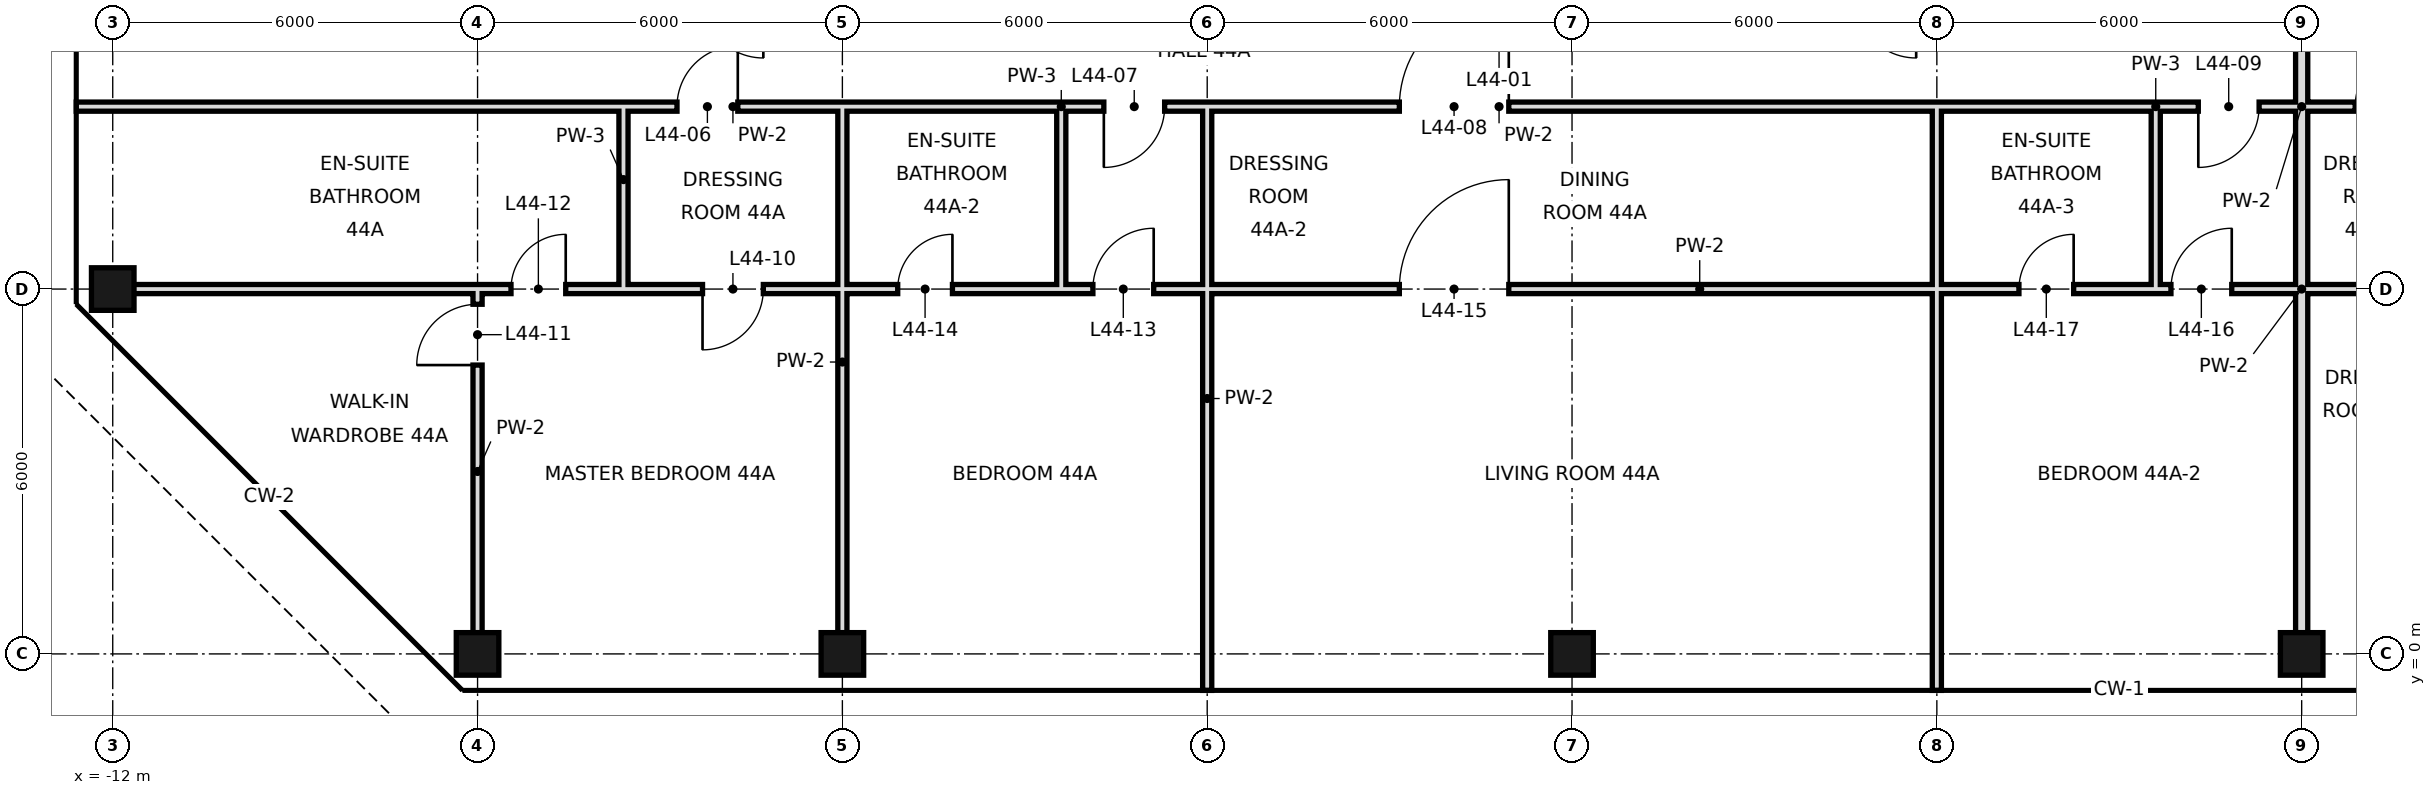
"""IFC4 building model, lengths in metres.
Left out: names, types, materials, properties, quantities, classifications, styles, units other than length and angle.
Written with IfcOpenShell. Run it as: python <this file> out.ifc"""

import sys

from ifc_helpers import new_model, si_unit, direction, frame, frame_2d, origin, origin_2d, place, context, subcontext, project, spatial, rectangle, hollow_rectangle, extrude, element, fill, save


model = new_model("IFC4")
c1 = context("Model", 3, precision=1e-05, world=origin(), true_north=direction((0.0, 1.0)))
c2 = subcontext(c1, "Body", "Model", "MODEL_VIEW")
j1 = project(units=[si_unit("LENGTHUNIT", "METRE"), si_unit("PLANEANGLEUNIT", "RADIAN")], contexts=[c1])
p1 = place(None, origin())
s1 = spatial("IfcSite", under=j1, at=p1, CompositionType="ELEMENT")
p2 = place(p1, origin())
s2 = spatial("IfcBuilding", under=s1, at=p2, CompositionType="ELEMENT")
p3 = place(p2, frame((0.0, 0.0, 192.0)))
s3 = spatial("IfcBuildingStorey", under=s2, at=p3, CompositionType="ELEMENT", Elevation=192.0)
for number, where, z_axis, x_axis in (
    (1, (-12.0, 6.0, -0.3), (0.0, 0.0, 1.0), (1.0, 0.0, 0.0)),
    (2, (-6.0, 0.0, -0.3), (0.0, 0.0, 1.0), (1.0, 0.0, 0.0)),
):
    element("IfcColumn", number, at=place(p3, frame(where, z_axis=z_axis, x_axis=x_axis)), inside=s3, PredefinedType="COLUMN", context=c2, shape_type="SweptSolid", body=[
        extrude(hollow_rectangle(XDim=0.7, YDim=0.7, WallThickness=0.036, at=origin_2d()), origin(), (0.0, 0.0, 1.0), 3.9),
    ])
for number, where, z_axis, x_axis in (
    (3, (0.0, 0.0, 0.0), (0.0, 0.0, 1.0), (1.0, 0.0, 0.0)),
    (4, (12.0, 0.0, 0.0), (0.0, 0.0, 1.0), (1.0, 0.0, 0.0)),
    (5, (24.0, 0.0, 0.0), (0.0, 0.0, 1.0), (1.0, 0.0, 0.0)),
):
    element("IfcColumn", number, at=place(p3, frame(where, z_axis=z_axis, x_axis=x_axis)), inside=s3, PredefinedType="COLUMN", context=c2, shape_type="SweptSolid", body=[
        extrude(hollow_rectangle(XDim=0.7, YDim=0.7, WallThickness=0.036, at=origin_2d()), origin(), (0.0, 0.0, 1.0), 3.6),
    ])
p4 = place(p3, frame((-3.6, 6.0, 0.0), z_axis=(0.0, 0.0, 1.0), x_axis=(0.0, 1.0, 0.0)))
e6 = element("IfcWall", 6, at=p4, inside=s3, PredefinedType="PARTITIONING", context=c2, shape_type="SweptSolid", body=[
    extrude(rectangle(XDim=3.0, YDim=0.15, at=frame_2d((1.5, 0.0))), origin(), (0.0, 0.0, 1.0), 3.42),
])
p5 = place(p3, frame((-6.0, 0.0, 0.0), z_axis=(0.0, 0.0, 1.0), x_axis=(0.0, 1.0, 0.0)))
e7 = element("IfcWall", 7, at=p5, inside=s3, PredefinedType="PARTITIONING", context=c2, shape_type="SweptSolid", body=[
    extrude(rectangle(XDim=6.0, YDim=0.15, at=frame_2d((3.0, 0.0))), origin(), (0.0, 0.0, 1.0), 3.42),
])
p6 = place(p5, frame((4.75, 0.0, 0.0)))
e8 = element("IfcOpeningElement", 8, at=p6, cuts=e7, PredefinedType="OPENING", context=c2, shape_type="SweptSolid", body=[
    extrude(rectangle(XDim=1.0, YDim=2.4, at=frame_2d((0.5, 1.2))), frame((0.0, 0.085, 0.0), z_axis=(0.0, -1.0, 0.0), x_axis=(1.0, 0.0, 0.0)), (0.0, 0.0, 1.0), 0.17),
])
p7 = place(p3, frame((0.0, 0.0, 0.0), z_axis=(0.0, 0.0, 1.0), x_axis=(0.0, 1.0, 0.0)))
e9 = element("IfcWall", 9, at=p7, inside=s3, PredefinedType="PARTITIONING", context=c2, shape_type="SweptSolid", body=[
    extrude(rectangle(XDim=6.0, YDim=0.15, at=frame_2d((3.0, 0.0))), origin(), (0.0, 0.0, 1.0), 2.72),
])
p8 = place(p3, frame((0.0, 6.0, 0.0), z_axis=(0.0, 0.0, 1.0), x_axis=(0.0, 1.0, 0.0)))
e10 = element("IfcWall", 10, at=p8, inside=s3, PredefinedType="PARTITIONING", context=c2, shape_type="SweptSolid", body=[
    extrude(rectangle(XDim=3.0, YDim=0.15, at=frame_2d((1.5, 0.0))), origin(), (0.0, 0.0, 1.0), 2.72),
])
p9 = place(p3, frame((18.0, -0.6, 0.0), z_axis=(0.0, 0.0, 1.0), x_axis=(0.0, 1.0, 0.0)))
e11 = element("IfcWall", 11, at=p9, inside=s3, PredefinedType="PARTITIONING", context=c2, shape_type="SweptSolid", body=[
    extrude(rectangle(XDim=6.6, YDim=0.15, at=frame_2d((3.3, 0.0))), origin(), (0.0, 0.0, 1.0), 2.72),
])
p10 = place(p3, frame((18.0, 6.0, 0.0), z_axis=(0.0, 0.0, 1.0), x_axis=(0.0, 1.0, 0.0)))
e12 = element("IfcWall", 12, at=p10, inside=s3, PredefinedType="PARTITIONING", context=c2, shape_type="SweptSolid", body=[
    extrude(rectangle(XDim=3.0, YDim=0.15, at=frame_2d((1.5, 0.0))), origin(), (0.0, 0.0, 1.0), 2.72),
])
p11 = place(p3, frame((21.6, 6.0, 0.0), z_axis=(0.0, 0.0, 1.0), x_axis=(0.0, 1.0, 0.0)))
e13 = element("IfcWall", 13, at=p11, inside=s3, PredefinedType="PARTITIONING", context=c2, shape_type="SweptSolid", body=[
    extrude(rectangle(XDim=3.0, YDim=0.15, at=frame_2d((1.5, 0.0))), origin(), (0.0, 0.0, 1.0), 3.42),
])
p12 = place(p3, frame((24.0, 0.0, 0.0), z_axis=(0.0, 0.0, 1.0), x_axis=(0.0, 1.0, 0.0)))
e14 = element("IfcWall", 14, at=p12, inside=s3, PredefinedType="SOLIDWALL", context=c2, shape_type="SweptSolid", body=[
    extrude(rectangle(XDim=15.3, YDim=0.2, at=frame_2d((7.65, 0.0))), origin(), (0.0, 0.0, 1.0), 2.72),
])
p13 = place(p3, frame((3.6, 6.0, 0.0), z_axis=(0.0, 0.0, 1.0), x_axis=(0.0, 1.0, 0.0)))
e15 = element("IfcWall", 15, at=p13, inside=s3, PredefinedType="PARTITIONING", context=c2, shape_type="SweptSolid", body=[
    extrude(rectangle(XDim=3.0, YDim=0.15, at=frame_2d((1.5, 0.0))), origin(), (0.0, 0.0, 1.0), 3.42),
])
p14 = place(p3, frame((6.0, -0.6, 0.0), z_axis=(0.0, 0.0, 1.0), x_axis=(0.0, 1.0, 0.0)))
e16 = element("IfcWall", 16, at=p14, inside=s3, PredefinedType="PARTITIONING", context=c2, shape_type="SweptSolid", body=[
    extrude(rectangle(XDim=9.6, YDim=0.15, at=frame_2d((4.8, 0.0))), origin(), (0.0, 0.0, 1.0), 2.72),
])
p15 = place(p3, frame((-3.6, 6.0, 0.0), z_axis=(0.0, 0.0, 1.0), x_axis=(1.0, 0.0, 0.0)))
e17 = element("IfcWall", 17, at=p15, inside=s3, PredefinedType="PARTITIONING", context=c2, shape_type="SweptSolid", body=[
    extrude(rectangle(XDim=3.6, YDim=0.15, at=frame_2d((1.8, 0.0))), origin(), (0.0, 0.0, 1.0), 2.72),
])
p16 = place(p15, frame((1.3, 0.0, 0.0)))
e18 = element("IfcOpeningElement", 18, at=p16, cuts=e17, PredefinedType="OPENING", context=c2, shape_type="SweptSolid", body=[
    extrude(rectangle(XDim=1.0, YDim=2.4, at=frame_2d((0.5, 1.2))), frame((0.0, 0.085, 0.0), z_axis=(0.0, -1.0, 0.0), x_axis=(1.0, 0.0, 0.0)), (0.0, 0.0, 1.0), 0.17),
])
p17 = place(p3, frame((3.6, 6.0, 0.0), z_axis=(0.0, 0.0, 1.0), x_axis=(1.0, 0.0, 0.0)))
e19 = element("IfcWall", 19, at=p17, inside=s3, PredefinedType="PARTITIONING", context=c2, shape_type="SweptSolid", body=[
    extrude(rectangle(XDim=14.4, YDim=0.15, at=frame_2d((7.2, 0.0))), origin(), (0.0, 0.0, 1.0), 2.97),
])
p18 = place(p17, frame((0.52, 0.0, 0.0)))
e20 = element("IfcOpeningElement", 20, at=p18, cuts=e19, PredefinedType="OPENING", context=c2, shape_type="SweptSolid", body=[
    extrude(rectangle(XDim=1.0, YDim=2.4, at=frame_2d((0.5, 1.2))), frame((0.0, 0.085, 0.0), z_axis=(0.0, -1.0, 0.0), x_axis=(1.0, 0.0, 0.0)), (0.0, 0.0, 1.0), 0.17),
])
p19 = place(p17, frame((5.56, 0.0, 0.0)))
e21 = element("IfcOpeningElement", 21, at=p19, cuts=e19, PredefinedType="OPENING", context=c2, shape_type="SweptSolid", body=[
    extrude(rectangle(XDim=1.8, YDim=2.4, at=frame_2d((0.9, 1.2))), frame((0.0, 0.085, 0.0), z_axis=(0.0, -1.0, 0.0), x_axis=(1.0, 0.0, 0.0)), (0.0, 0.0, 1.0), 0.17),
])
p20 = place(p3, frame((21.6, 6.0, 0.0), z_axis=(0.0, 0.0, 1.0), x_axis=(1.0, 0.0, 0.0)))
e22 = element("IfcWall", 22, at=p20, inside=s3, PredefinedType="PARTITIONING", context=c2, shape_type="SweptSolid", body=[
    extrude(rectangle(XDim=4.8, YDim=0.15, at=frame_2d((2.4, 0.0))), origin(), (0.0, 0.0, 1.0), 2.97),
])
p21 = place(p20, frame((0.25, 0.0, 0.0)))
e23 = element("IfcOpeningElement", 23, at=p21, cuts=e22, PredefinedType="OPENING", context=c2, shape_type="SweptSolid", body=[
    extrude(rectangle(XDim=1.0, YDim=2.4, at=frame_2d((0.5, 1.2))), frame((0.0, 0.085, 0.0), z_axis=(0.0, -1.0, 0.0), x_axis=(1.0, 0.0, 0.0)), (0.0, 0.0, 1.0), 0.17),
])
p22 = place(p20, frame((3.55, 0.0, 0.0)))
e24 = element("IfcOpeningElement", 24, at=p22, cuts=e22, PredefinedType="OPENING", context=c2, shape_type="SweptSolid", body=[
    extrude(rectangle(XDim=1.0, YDim=2.4, at=frame_2d((0.5, 1.2))), frame((0.0, 0.085, 0.0), z_axis=(0.0, -1.0, 0.0), x_axis=(1.0, 0.0, 0.0)), (0.0, 0.0, 1.0), 0.17),
])
p23 = place(p3, frame((-12.0, 6.0, 0.0), z_axis=(0.0, 0.0, 1.0), x_axis=(1.0, 0.0, 0.0)))
e25 = element("IfcWall", 25, at=p23, inside=s3, PredefinedType="PARTITIONING", context=c2, shape_type="SweptSolid", body=[
    extrude(rectangle(XDim=8.4, YDim=0.15, at=frame_2d((4.2, 0.0))), origin(), (0.0, 0.0, 1.0), 2.72),
])
p24 = place(p23, frame((6.55, 0.0, 0.0)))
e26 = element("IfcOpeningElement", 26, at=p24, cuts=e25, PredefinedType="OPENING", context=c2, shape_type="SweptSolid", body=[
    extrude(rectangle(XDim=0.9, YDim=2.4, at=frame_2d((0.45, 1.2))), frame((0.0, 0.085, 0.0), z_axis=(0.0, -1.0, 0.0), x_axis=(1.0, 0.0, 0.0)), (0.0, 0.0, 1.0), 0.17),
])
p25 = place(p3, frame((0.0, 6.0, 0.0), z_axis=(0.0, 0.0, 1.0), x_axis=(1.0, 0.0, 0.0)))
e27 = element("IfcWall", 27, at=p25, inside=s3, PredefinedType="PARTITIONING", context=c2, shape_type="SweptSolid", body=[
    extrude(rectangle(XDim=3.6, YDim=0.15, at=frame_2d((1.8, 0.0))), origin(), (0.0, 0.0, 1.0), 2.97),
])
p26 = place(p25, frame((0.91, 0.0, 0.0)))
e28 = element("IfcOpeningElement", 28, at=p26, cuts=e27, PredefinedType="OPENING", context=c2, shape_type="SweptSolid", body=[
    extrude(rectangle(XDim=0.9, YDim=2.4, at=frame_2d((0.45, 1.2))), frame((0.0, 0.085, 0.0), z_axis=(0.0, -1.0, 0.0), x_axis=(1.0, 0.0, 0.0)), (0.0, 0.0, 1.0), 0.17),
])
p27 = place(p3, frame((18.0, 6.0, 0.0), z_axis=(0.0, 0.0, 1.0), x_axis=(1.0, 0.0, 0.0)))
e29 = element("IfcWall", 29, at=p27, inside=s3, PredefinedType="PARTITIONING", context=c2, shape_type="SweptSolid", body=[
    extrude(rectangle(XDim=3.6, YDim=0.15, at=frame_2d((1.8, 0.0))), origin(), (0.0, 0.0, 1.0), 2.97),
])
p28 = place(p27, frame((1.35, 0.0, 0.0)))
e30 = element("IfcOpeningElement", 30, at=p28, cuts=e29, PredefinedType="OPENING", context=c2, shape_type="SweptSolid", body=[
    extrude(rectangle(XDim=0.9, YDim=2.4, at=frame_2d((0.45, 1.2))), frame((0.0, 0.085, 0.0), z_axis=(0.0, -1.0, 0.0), x_axis=(1.0, 0.0, 0.0)), (0.0, 0.0, 1.0), 0.17),
])
p29 = place(p3, frame((-3.6, 9.0, 0.0), z_axis=(0.0, 0.0, 1.0), x_axis=(1.0, 0.0, 0.0)))
e31 = element("IfcWall", 31, at=p29, inside=s3, PredefinedType="PARTITIONING", context=c2, shape_type="SweptSolid", body=[
    extrude(rectangle(XDim=3.6, YDim=0.15, at=frame_2d((1.8, 0.0))), origin(), (0.0, 0.0, 1.0), 3.42),
])
p30 = place(p29, frame((0.88, 0.0, 0.0)))
e32 = element("IfcOpeningElement", 32, at=p30, cuts=e31, PredefinedType="OPENING", context=c2, shape_type="SweptSolid", body=[
    extrude(rectangle(XDim=1.0, YDim=2.4, at=frame_2d((0.5, 1.2))), frame((0.0, 0.085, 0.0), z_axis=(0.0, -1.0, 0.0), x_axis=(1.0, 0.0, 0.0)), (0.0, 0.0, 1.0), 0.17),
])
p31 = place(p3, frame((3.6, 9.0, 0.0), z_axis=(0.0, 0.0, 1.0), x_axis=(1.0, 0.0, 0.0)))
e33 = element("IfcWall", 33, at=p31, inside=s3, PredefinedType="PARTITIONING", context=c2, shape_type="SweptSolid", body=[
    extrude(rectangle(XDim=14.4, YDim=0.15, at=frame_2d((7.2, 0.0))), origin(), (0.0, 0.0, 1.0), 3.42),
])
p32 = place(p31, frame((0.7, 0.0, 0.0)))
e34 = element("IfcOpeningElement", 34, at=p32, cuts=e33, PredefinedType="OPENING", context=c2, shape_type="SweptSolid", body=[
    extrude(rectangle(XDim=1.0, YDim=2.4, at=frame_2d((0.5, 1.2))), frame((0.0, 0.085, 0.0), z_axis=(0.0, -1.0, 0.0), x_axis=(1.0, 0.0, 0.0)), (0.0, 0.0, 1.0), 0.17),
])
p33 = place(p31, frame((5.56, 0.0, 0.0)))
e35 = element("IfcOpeningElement", 35, at=p33, cuts=e33, PredefinedType="OPENING", context=c2, shape_type="SweptSolid", body=[
    extrude(rectangle(XDim=1.8, YDim=2.4, at=frame_2d((0.9, 1.2))), frame((0.0, 0.085, 0.0), z_axis=(0.0, -1.0, 0.0), x_axis=(1.0, 0.0, 0.0)), (0.0, 0.0, 1.0), 0.17),
])
p34 = place(p3, frame((21.6, 9.0, 0.0), z_axis=(0.0, 0.0, 1.0), x_axis=(1.0, 0.0, 0.0)))
e36 = element("IfcWall", 36, at=p34, inside=s3, PredefinedType="PARTITIONING", context=c2, shape_type="SweptSolid", body=[
    extrude(rectangle(XDim=4.8, YDim=0.15, at=frame_2d((2.4, 0.0))), origin(), (0.0, 0.0, 1.0), 3.42),
])
p35 = place(p34, frame((0.7, 0.0, 0.0)))
e37 = element("IfcOpeningElement", 37, at=p35, cuts=e36, PredefinedType="OPENING", context=c2, shape_type="SweptSolid", body=[
    extrude(rectangle(XDim=1.0, YDim=2.4, at=frame_2d((0.5, 1.2))), frame((0.0, 0.085, 0.0), z_axis=(0.0, -1.0, 0.0), x_axis=(1.0, 0.0, 0.0)), (0.0, 0.0, 1.0), 0.17),
])
p36 = place(p34, frame((3.28, 0.0, 0.0)))
e38 = element("IfcOpeningElement", 38, at=p36, cuts=e36, PredefinedType="OPENING", context=c2, shape_type="SweptSolid", body=[
    extrude(rectangle(XDim=1.0, YDim=2.4, at=frame_2d((0.5, 1.2))), frame((0.0, 0.085, 0.0), z_axis=(0.0, -1.0, 0.0), x_axis=(1.0, 0.0, 0.0)), (0.0, 0.0, 1.0), 0.17),
])
p37 = place(p3, frame((-12.6, 9.0, 0.0), z_axis=(0.0, 0.0, 1.0), x_axis=(1.0, 0.0, 0.0)))
e39 = element("IfcWall", 39, at=p37, inside=s3, PredefinedType="PARTITIONING", context=c2, shape_type="SweptSolid", body=[
    extrude(rectangle(XDim=9.0, YDim=0.15, at=frame_2d((4.5, 0.0))), origin(), (0.0, 0.0, 1.0), 3.42),
])
for number, where, z_axis, x_axis in (
    (40, (0.0, 9.0, 0.0), (0.0, 0.0, 1.0), (1.0, 0.0, 0.0)),
    (41, (18.0, 9.0, 0.0), (0.0, 0.0, 1.0), (1.0, 0.0, 0.0)),
):
    element("IfcWall", number, at=place(p3, frame(where, z_axis=z_axis, x_axis=x_axis)), inside=s3, PredefinedType="PARTITIONING", context=c2, shape_type="SweptSolid", body=[
        extrude(rectangle(XDim=3.6, YDim=0.15, at=frame_2d((1.8, 0.0))), origin(), (0.0, 0.0, 1.0), 3.42),
    ])
p38 = place(p30, frame((1.0, 0.0, 0.0), z_axis=(0.0, 0.0, 1.0), x_axis=(-1.0, 0.0, 0.0)))
e42 = element("IfcDoor", 42, at=p38, inside=s3, OperationType="SINGLE_SWING_LEFT", PredefinedType="DOOR", context=c2, shape_type="SweptSolid", body=[
    extrude(rectangle(XDim=1.0, YDim=2.4, at=frame_2d((0.5, 1.2))), frame((0.0, 0.025, 0.0), z_axis=(0.0, -1.0, 0.0), x_axis=(1.0, 0.0, 0.0)), (0.0, 0.0, 1.0), 0.05),
])
fill(e32, e42)
p39 = place(p32, frame((1.0, 0.0, 0.0), z_axis=(0.0, 0.0, 1.0), x_axis=(-1.0, 0.0, 0.0)))
e43 = element("IfcDoor", 43, at=p39, inside=s3, OperationType="SINGLE_SWING_RIGHT", PredefinedType="DOOR", context=c2, shape_type="SweptSolid", body=[
    extrude(rectangle(XDim=1.0, YDim=2.4, at=frame_2d((0.5, 1.2))), frame((0.0, 0.025, 0.0), z_axis=(0.0, -1.0, 0.0), x_axis=(1.0, 0.0, 0.0)), (0.0, 0.0, 1.0), 0.05),
])
fill(e34, e43)
p40 = place(p33, frame((1.8, 0.0, 0.0), z_axis=(0.0, 0.0, 1.0), x_axis=(-1.0, 0.0, 0.0)))
e44 = element("IfcDoor", 44, at=p40, inside=s3, OperationType="SINGLE_SWING_LEFT", PredefinedType="DOOR", context=c2, shape_type="SweptSolid", body=[
    extrude(rectangle(XDim=1.8, YDim=2.4, at=frame_2d((0.9, 1.2))), frame((0.0, 0.025, 0.0), z_axis=(0.0, -1.0, 0.0), x_axis=(1.0, 0.0, 0.0)), (0.0, 0.0, 1.0), 0.05),
])
fill(e35, e44)
p41 = place(p35, frame((1.0, 0.0, 0.0), z_axis=(0.0, 0.0, 1.0), x_axis=(-1.0, 0.0, 0.0)))
e45 = element("IfcDoor", 45, at=p41, inside=s3, OperationType="SINGLE_SWING_RIGHT", PredefinedType="DOOR", context=c2, shape_type="SweptSolid", body=[
    extrude(rectangle(XDim=1.0, YDim=2.4, at=frame_2d((0.5, 1.2))), frame((0.0, 0.025, 0.0), z_axis=(0.0, -1.0, 0.0), x_axis=(1.0, 0.0, 0.0)), (0.0, 0.0, 1.0), 0.05),
])
fill(e37, e45)
p42 = place(p16, frame((1.0, 0.0, 0.0), z_axis=(0.0, 0.0, 1.0), x_axis=(-1.0, 0.0, 0.0)))
e46 = element("IfcDoor", 46, at=p42, inside=s3, OperationType="SINGLE_SWING_RIGHT", PredefinedType="DOOR", context=c2, shape_type="SweptSolid", body=[
    extrude(rectangle(XDim=1.0, YDim=2.4, at=frame_2d((0.5, 1.2))), frame((0.0, 0.025, 0.0), z_axis=(0.0, -1.0, 0.0), x_axis=(1.0, 0.0, 0.0)), (0.0, 0.0, 1.0), 0.05),
])
fill(e18, e46)
p43 = place(p6, origin())
e47 = element("IfcDoor", 47, at=p43, inside=s3, OperationType="SINGLE_SWING_LEFT", PredefinedType="DOOR", context=c2, shape_type="SweptSolid", body=[
    extrude(rectangle(XDim=1.0, YDim=2.4, at=frame_2d((0.5, 1.2))), frame((0.0, 0.025, 0.0), z_axis=(0.0, -1.0, 0.0), x_axis=(1.0, 0.0, 0.0)), (0.0, 0.0, 1.0), 0.05),
])
fill(e8, e47)
p44 = place(p24, frame((0.9, 0.0, 0.0), z_axis=(0.0, 0.0, 1.0), x_axis=(-1.0, 0.0, 0.0)))
e48 = element("IfcDoor", 48, at=p44, inside=s3, OperationType="SINGLE_SWING_LEFT", PredefinedType="DOOR", context=c2, shape_type="SweptSolid", body=[
    extrude(rectangle(XDim=0.9, YDim=2.4, at=frame_2d((0.45, 1.2))), frame((0.0, 0.025, 0.0), z_axis=(0.0, -1.0, 0.0), x_axis=(1.0, 0.0, 0.0)), (0.0, 0.0, 1.0), 0.05),
])
fill(e26, e48)
p45 = place(p18, frame((1.0, 0.0, 0.0), z_axis=(0.0, 0.0, 1.0), x_axis=(-1.0, 0.0, 0.0)))
e49 = element("IfcDoor", 49, at=p45, inside=s3, OperationType="SINGLE_SWING_LEFT", PredefinedType="DOOR", context=c2, shape_type="SweptSolid", body=[
    extrude(rectangle(XDim=1.0, YDim=2.4, at=frame_2d((0.5, 1.2))), frame((0.0, 0.025, 0.0), z_axis=(0.0, -1.0, 0.0), x_axis=(1.0, 0.0, 0.0)), (0.0, 0.0, 1.0), 0.05),
])
fill(e20, e49)
p46 = place(p26, frame((0.9, 0.0, 0.0), z_axis=(0.0, 0.0, 1.0), x_axis=(-1.0, 0.0, 0.0)))
e50 = element("IfcDoor", 50, at=p46, inside=s3, OperationType="SINGLE_SWING_LEFT", PredefinedType="DOOR", context=c2, shape_type="SweptSolid", body=[
    extrude(rectangle(XDim=0.9, YDim=2.4, at=frame_2d((0.45, 1.2))), frame((0.0, 0.025, 0.0), z_axis=(0.0, -1.0, 0.0), x_axis=(1.0, 0.0, 0.0)), (0.0, 0.0, 1.0), 0.05),
])
fill(e28, e50)
p47 = place(p19, frame((1.8, 0.0, 0.0), z_axis=(0.0, 0.0, 1.0), x_axis=(-1.0, 0.0, 0.0)))
e51 = element("IfcDoor", 51, at=p47, inside=s3, OperationType="SINGLE_SWING_LEFT", PredefinedType="DOOR", context=c2, shape_type="SweptSolid", body=[
    extrude(rectangle(XDim=1.8, YDim=2.4, at=frame_2d((0.9, 1.2))), frame((0.0, 0.025, 0.0), z_axis=(0.0, -1.0, 0.0), x_axis=(1.0, 0.0, 0.0)), (0.0, 0.0, 1.0), 0.05),
])
fill(e21, e51)
p48 = place(p21, frame((1.0, 0.0, 0.0), z_axis=(0.0, 0.0, 1.0), x_axis=(-1.0, 0.0, 0.0)))
e52 = element("IfcDoor", 52, at=p48, inside=s3, OperationType="SINGLE_SWING_LEFT", PredefinedType="DOOR", context=c2, shape_type="SweptSolid", body=[
    extrude(rectangle(XDim=1.0, YDim=2.4, at=frame_2d((0.5, 1.2))), frame((0.0, 0.025, 0.0), z_axis=(0.0, -1.0, 0.0), x_axis=(1.0, 0.0, 0.0)), (0.0, 0.0, 1.0), 0.05),
])
fill(e23, e52)
p49 = place(p28, frame((0.9, 0.0, 0.0), z_axis=(0.0, 0.0, 1.0), x_axis=(-1.0, 0.0, 0.0)))
e53 = element("IfcDoor", 53, at=p49, inside=s3, OperationType="SINGLE_SWING_LEFT", PredefinedType="DOOR", context=c2, shape_type="SweptSolid", body=[
    extrude(rectangle(XDim=0.9, YDim=2.4, at=frame_2d((0.45, 1.2))), frame((0.0, 0.025, 0.0), z_axis=(0.0, -1.0, 0.0), x_axis=(1.0, 0.0, 0.0)), (0.0, 0.0, 1.0), 0.05),
])
fill(e30, e53)
p50 = place(p36, frame((1.0, 0.0, 0.0), z_axis=(0.0, 0.0, 1.0), x_axis=(-1.0, 0.0, 0.0)))
e54 = element("IfcDoor", 54, at=p50, inside=s3, OperationType="SINGLE_SWING_LEFT", PredefinedType="DOOR", context=c2, shape_type="SweptSolid", body=[
    extrude(rectangle(XDim=1.0, YDim=2.4, at=frame_2d((0.5, 1.2))), frame((0.0, 0.025, 0.0), z_axis=(0.0, -1.0, 0.0), x_axis=(1.0, 0.0, 0.0)), (0.0, 0.0, 1.0), 0.05),
])
fill(e38, e54)
save(model, sys.argv[1])
